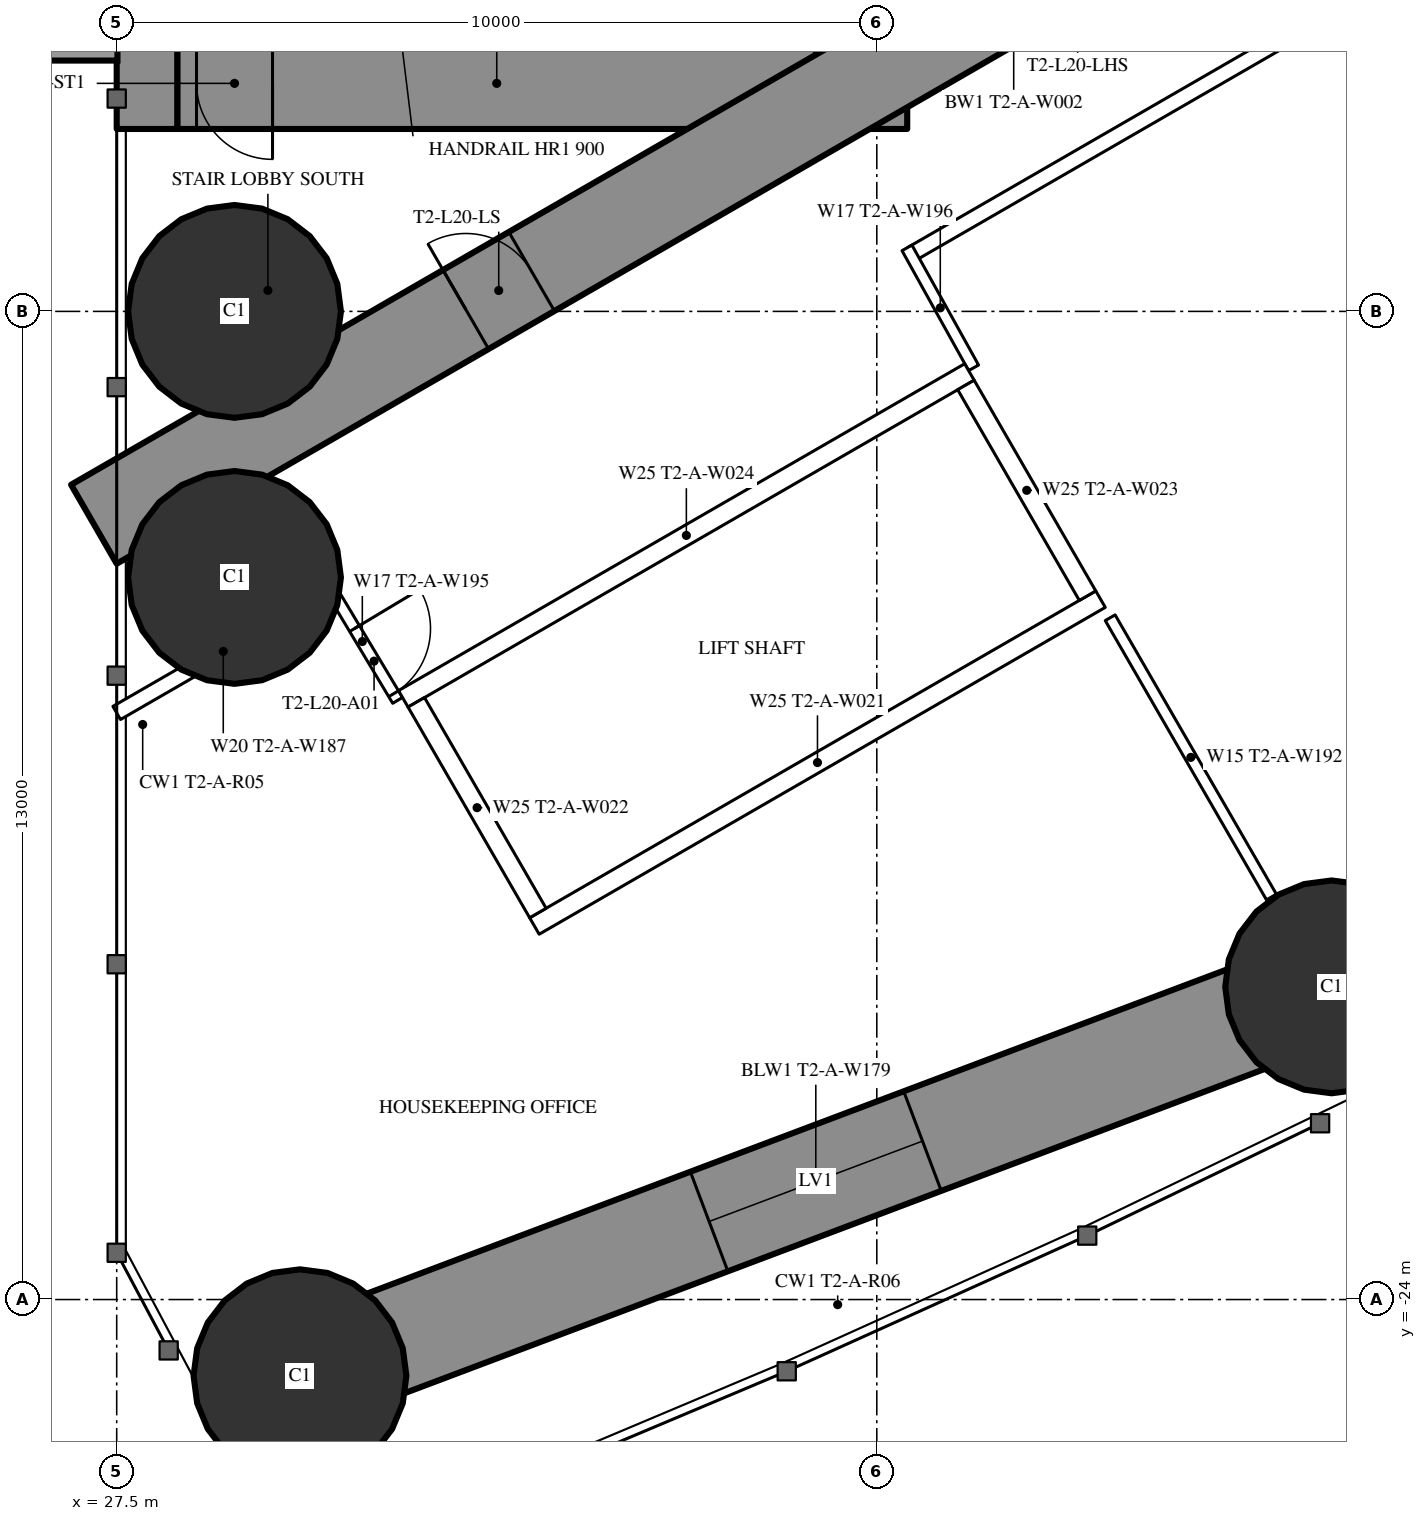
"""IFC4 building model, lengths in metres.
Left out: names, types, materials, properties, quantities, classifications, styles, units other than length and angle.
Written with IfcOpenShell. Run it as: python <this file> out.ifc"""

import sys

from ifc_helpers import new_model, si_unit, direction, frame, frame_2d, origin, origin_2d, place, context, subcontext, project, spatial, rectangle, hollow_circle, extrude, element, fill, save


model = new_model("IFC4")
c1 = context("Model", 3, precision=1e-05, world=origin(), true_north=direction((0.0, 1.0)))
c2 = subcontext(c1, "Body", "Model", "MODEL_VIEW")
j1 = project(units=[si_unit("LENGTHUNIT", "METRE"), si_unit("PLANEANGLEUNIT", "RADIAN")], contexts=[c1])
p1 = place(None, origin())
s1 = spatial("IfcSite", under=j1, at=p1, CompositionType="ELEMENT")
p2 = place(p1, origin())
s2 = spatial("IfcBuilding", under=s1, at=p2, CompositionType="ELEMENT")
p3 = place(p2, frame((0.0, 0.0, 77.5)))
s3 = spatial("IfcBuildingStorey", under=s2, at=p3, CompositionType="ELEMENT", Elevation=77.5)
for number, where, z_axis, x_axis in (
    (1, (29.911, -25.002, 0.0), (0.0, 0.0, 1.0), (1.0, 0.0, 0.0)),
    (2, (29.05, -11.0, 0.0), (0.0, 0.0, 1.0), (1.0, 0.0, 0.0)),
    (3, (29.05, -14.5, 0.0), (0.0, 0.0, 1.0), (1.0, 0.0, 0.0)),
    (4, (43.484, -19.886, 0.0), (0.0, 0.0, 1.0), (1.0, 0.0, 0.0)),
):
    element("IfcColumn", number, at=place(p3, frame(where, z_axis=z_axis, x_axis=x_axis)), inside=s3, PredefinedType="COLUMN", context=c2, shape_type="SweptSolid", body=[
        extrude(hollow_circle(Radius=1.4, WallThickness=0.12, at=origin_2d()), origin(), (0.0, 0.0, 1.0), 3.5),
    ])
p4 = place(p3, frame((27.9, -8.6, 0.0), z_axis=(0.0, 0.0, 1.0), x_axis=(0.0, 1.0, 0.0)))
e5 = element("IfcWall", 5, at=p4, inside=s3, PredefinedType="SHEAR", context=c2, shape_type="SweptSolid", body=[
    extrude(rectangle(XDim=17.2, YDim=0.8, at=frame_2d((8.6, 0.0))), origin(), (0.0, 0.0, 1.0), 3.5),
])
p5 = place(p4, frame((2.45, 0.0, 0.6)))
e6 = element("IfcOpeningElement", 6, at=p5, cuts=e5, PredefinedType="OPENING", context=c2, shape_type="SweptSolid", body=[
    extrude(rectangle(XDim=0.6, YDim=2.1, at=frame_2d((0.3, 1.05))), frame((0.0, 0.41, 0.0), z_axis=(0.0, -1.0, 0.0), x_axis=(1.0, 0.0, 0.0)), (0.0, 0.0, 1.0), 0.82),
])
p6 = place(p4, frame((14.15, 0.0, 0.6)))
e7 = element("IfcOpeningElement", 7, at=p6, cuts=e5, PredefinedType="OPENING", context=c2, shape_type="SweptSolid", body=[
    extrude(rectangle(XDim=0.6, YDim=2.1, at=frame_2d((0.3, 1.05))), frame((0.0, 0.41, 0.0), z_axis=(0.0, -1.0, 0.0), x_axis=(1.0, 0.0, 0.0)), (0.0, 0.0, 1.0), 0.82),
])
p7 = place(p3, frame((37.3, -8.6, 0.0), z_axis=(0.0, 0.0, 1.0), x_axis=(0.0, 1.0, 0.0)))
e8 = element("IfcWall", 8, at=p7, inside=s3, PredefinedType="SHEAR", context=c2, shape_type="SweptSolid", body=[
    extrude(rectangle(XDim=17.2, YDim=1.2, at=frame_2d((8.6, 0.0))), origin(), (0.0, 0.0, 1.0), 3.5),
])
p8 = place(p7, frame((7.7, 0.0, 0.0)))
e9 = element("IfcOpeningElement", 9, at=p8, cuts=e8, PredefinedType="OPENING", context=c2, shape_type="SweptSolid", body=[
    extrude(rectangle(XDim=1.8, YDim=2.2, at=frame_2d((0.9, 1.1))), frame((0.0, 0.61, 0.0), z_axis=(0.0, -1.0, 0.0), x_axis=(1.0, 0.0, 0.0)), (0.0, 0.0, 1.0), 1.22),
])
p9 = place(p3, frame((28.3, -8.0, 0.0), z_axis=(0.0, 0.0, 1.0), x_axis=(1.0, 0.0, 0.0)))
e10 = element("IfcWall", 10, at=p9, inside=s3, PredefinedType="SHEAR", context=c2, shape_type="SweptSolid", body=[
    extrude(rectangle(XDim=8.4, YDim=1.2, at=frame_2d((4.2, 0.0))), origin(), (0.0, 0.0, 1.0), 3.5),
])
p10 = place(p9, frame((0.25, 0.0, 0.0)))
e11 = element("IfcOpeningElement", 11, at=p10, cuts=e10, PredefinedType="OPENING", context=c2, shape_type="SweptSolid", body=[
    extrude(rectangle(XDim=1.0, YDim=2.2, at=frame_2d((0.5, 1.1))), frame((0.0, 0.61, 0.0), z_axis=(0.0, -1.0, 0.0), x_axis=(1.0, 0.0, 0.0)), (0.0, 0.0, 1.0), 1.22),
])
p11 = place(p3, frame((27.2, -13.8, 0.0), z_axis=(0.0, 0.0, 1.0), x_axis=(0.866027159892, 0.499996958321, 0.0)))
e12 = element("IfcWall", 12, at=p11, inside=s3, PredefinedType="SHEAR", context=c2, shape_type="SweptSolid", body=[
    extrude(rectangle(XDim=27.947, YDim=1.2, at=frame_2d((13.973, 0.0))), origin(), (0.0, 0.0, 1.0), 3.5),
])
p12 = place(p11, frame((5.65, 0.0, 0.0)))
e13 = element("IfcOpeningElement", 13, at=p12, cuts=e12, PredefinedType="OPENING", context=c2, shape_type="SweptSolid", body=[
    extrude(rectangle(XDim=1.0, YDim=2.2, at=frame_2d((0.5, 1.1))), frame((0.0, 0.61, 0.0), z_axis=(0.0, -1.0, 0.0), x_axis=(1.0, 0.0, 0.0)), (0.0, 0.0, 1.0), 1.22),
])
p13 = place(p11, frame((14.045, 0.0, 0.0)))
e14 = element("IfcOpeningElement", 14, at=p13, cuts=e12, PredefinedType="OPENING", context=c2, shape_type="SweptSolid", body=[
    extrude(rectangle(XDim=1.8, YDim=2.2, at=frame_2d((0.9, 1.1))), frame((0.0, 0.61, 0.0), z_axis=(0.0, -1.0, 0.0), x_axis=(1.0, 0.0, 0.0)), (0.0, 0.0, 1.0), 1.22),
])
p14 = place(p3, frame((29.911, -25.002, 0.0), z_axis=(0.0, 0.0, 1.0), x_axis=(0.935736448066, 0.352700013836, 0.0)))
e15 = element("IfcWall", 15, at=p14, inside=s3, PredefinedType="SHEAR", context=c2, shape_type="SweptSolid", body=[
    extrude(rectangle(XDim=14.505, YDim=1.4, at=frame_2d((7.252, 0.0))), origin(), (0.0, 0.0, 1.0), 3.5),
])
p15 = place(p14, frame((5.752, 0.0, 0.6)))
e16 = element("IfcOpeningElement", 16, at=p15, cuts=e15, PredefinedType="OPENING", context=c2, shape_type="SweptSolid", body=[
    extrude(rectangle(XDim=3.0, YDim=1.2, at=frame_2d((1.5, 0.6))), frame((0.0, 0.71, 0.0), z_axis=(0.0, -1.0, 0.0), x_axis=(1.0, 0.0, 0.0)), (0.0, 0.0, 1.0), 1.42),
])
p16 = place(p3, frame((43.484, -19.886, 0.0), z_axis=(0.0, 0.0, 1.0), x_axis=(0.87736889738, 0.479816441893, 0.0)))
e17 = element("IfcWall", 17, at=p16, inside=s3, PredefinedType="SHEAR", context=c2, shape_type="SweptSolid", body=[
    extrude(rectangle(XDim=12.892, YDim=1.4, at=frame_2d((6.446, 0.0))), origin(), (0.0, 0.0, 1.0), 3.5),
])
p17 = place(p16, frame((4.946, 0.0, 0.6)))
e18 = element("IfcOpeningElement", 18, at=p17, cuts=e17, PredefinedType="OPENING", context=c2, shape_type="SweptSolid", body=[
    extrude(rectangle(XDim=3.0, YDim=1.2, at=frame_2d((1.5, 0.6))), frame((0.0, 0.71, 0.0), z_axis=(0.0, -1.0, 0.0), x_axis=(1.0, 0.0, 0.0)), (0.0, 0.0, 1.0), 1.42),
])
p18 = place(p3, frame((40.57, -15.03, 0.0), z_axis=(0.0, 0.0, 1.0), x_axis=(0.500012993597, -0.866017901798, 0.0)))
e19 = element("IfcWall", 19, at=p18, inside=s3, PredefinedType="PARTITIONING", context=c2, shape_type="SweptSolid", body=[
    extrude(rectangle(XDim=4.243, YDim=0.15, at=frame_2d((2.122, 0.0))), origin(), (0.0, 0.0, 1.0), 3.25),
])
p19 = place(p3, frame((27.5, -16.282, 0.0), z_axis=(0.0, 0.0, 1.0), x_axis=(0.866039938485, 0.499974824316, 0.0)))
e20 = element("IfcWall", 20, at=p19, inside=s3, PredefinedType="PARTITIONING", context=c2, shape_type="SweptSolid", body=[
    extrude(rectangle(XDim=3.238, YDim=0.2, at=frame_2d((1.619, 0.0))), origin(), (0.0, 0.0, 1.0), 3.25),
])
p20 = place(p3, frame((37.96, -10.243, 0.0), z_axis=(0.0, 0.0, 1.0), x_axis=(0.866026429433, 0.499998223521, 0.0)))
e21 = element("IfcWall", 21, at=p20, inside=s3, PredefinedType="PARTITIONING", context=c2, shape_type="SweptSolid", body=[
    extrude(rectangle(XDim=20.487, YDim=0.2, at=frame_2d((10.243, 0.0))), origin(), (0.0, 0.0, 1.0), 3.25),
])
p21 = place(p20, frame((14.142, 0.0, 0.0)))
e22 = element("IfcOpeningElement", 22, at=p21, cuts=e21, PredefinedType="OPENING", context=c2, shape_type="SweptSolid", body=[
    extrude(rectangle(XDim=1.8, YDim=2.2, at=frame_2d((0.9, 1.1))), frame((0.0, 0.11, 0.0), z_axis=(0.0, -1.0, 0.0), x_axis=(1.0, 0.0, 0.0)), (0.0, 0.0, 1.0), 0.22),
])
p22 = place(p20, frame((17.836, 0.0, 0.0)))
e23 = element("IfcOpeningElement", 23, at=p22, cuts=e21, PredefinedType="OPENING", context=c2, shape_type="SweptSolid", body=[
    extrude(rectangle(XDim=1.8, YDim=2.04, at=frame_2d((0.9, 1.02))), frame((0.0, 0.11, 0.0), z_axis=(0.0, -1.0, 0.0), x_axis=(1.0, 0.0, 0.0)), (0.0, 0.0, 1.0), 0.22),
])
p23 = place(p20, frame((5.55, 0.0, 0.0)))
e24 = element("IfcOpeningElement", 24, at=p23, cuts=e21, PredefinedType="OPENING", context=c2, shape_type="SweptSolid", body=[
    extrude(rectangle(XDim=2.0, YDim=2.4, at=frame_2d((1.0, 1.2))), frame((0.0, 0.11, 0.0), z_axis=(0.0, -1.0, 0.0), x_axis=(1.0, 0.0, 0.0)), (0.0, 0.0, 1.0), 0.22),
])
p24 = place(p3, frame((30.267, -14.569, 0.0), z_axis=(0.0, 0.0, 1.0), x_axis=(0.514336634837, -0.857588377991, 0.0)))
e25 = element("IfcWall", 25, at=p24, inside=s3, PredefinedType="PARTITIONING", context=c2, shape_type="SweptSolid", body=[
    extrude(rectangle(XDim=1.805, YDim=0.15, at=frame_2d((0.903, 0.0))), origin(), (0.0, 0.0, 1.0), 3.25),
])
p25 = place(p24, frame((0.703, 0.0, 0.0)))
e26 = element("IfcOpeningElement", 26, at=p25, cuts=e25, PredefinedType="OPENING", context=c2, shape_type="SweptSolid", body=[
    extrude(rectangle(XDim=1.0, YDim=2.04, at=frame_2d((0.5, 1.02))), frame((0.0, 0.085, 0.0), z_axis=(0.0, -1.0, 0.0), x_axis=(1.0, 0.0, 0.0)), (0.0, 0.0, 1.0), 0.17),
])
p26 = place(p3, frame((38.773, -11.742, 0.0), z_axis=(0.0, 0.0, 1.0), x_axis=(-0.485528096672, 0.8742210632, 0.0)))
e27 = element("IfcWall", 27, at=p26, inside=s3, PredefinedType="PARTITIONING", context=c2, shape_type="SweptSolid", body=[
    extrude(rectangle(XDim=1.805, YDim=0.15, at=frame_2d((0.903, 0.0))), origin(), (0.0, 0.0, 1.0), 3.25),
])
for number, where, z_axis, x_axis in (
    (28, (31.271, -16.097, 0.0), (0.0, 0.0, 1.0), (0.866, 0.5, 0.0)),
    (29, (32.996, -19.086, 0.0), (0.0, 0.0, 1.0), (0.866, 0.5, 0.0)),
):
    element("IfcWall", number, at=place(p3, frame(where, z_axis=z_axis, x_axis=x_axis)), inside=s3, PredefinedType="PARTITIONING", context=c2, shape_type="SweptSolid", body=[
        extrude(rectangle(XDim=8.6, YDim=0.25, at=frame_2d((4.3, 0.0))), origin(), (0.0, 0.0, 1.0), 3.25),
    ])
for number, where, z_axis, x_axis in (
    (30, (31.441, -16.143, 0.0), (0.0, 0.0, 1.0), (0.5, -0.866, 0.0)),
    (31, (38.673, -11.968, 0.0), (0.0, 0.0, 1.0), (0.5, -0.866, 0.0)),
):
    element("IfcWall", number, at=place(p3, frame(where, z_axis=z_axis, x_axis=x_axis)), inside=s3, PredefinedType="PARTITIONING", context=c2, shape_type="SweptSolid", body=[
        extrude(rectangle(XDim=3.201, YDim=0.25, at=frame_2d((1.6, 0.0))), origin(), (0.0, 0.0, 1.0), 3.25),
    ])
p27 = place(p15, origin())
e32 = element("IfcWindow", 32, at=p27, inside=s3, PartitioningType="SINGLE_PANEL", PredefinedType="WINDOW", context=c2, shape_type="SweptSolid", body=[
    extrude(rectangle(XDim=3.0, YDim=1.2, at=frame_2d((1.5, 0.6))), frame((0.0, 0.03, 0.0), z_axis=(0.0, -1.0, 0.0), x_axis=(1.0, 0.0, 0.0)), (0.0, 0.0, 1.0), 0.06),
])
fill(e16, e32)
p28 = place(p25, origin())
e33 = element("IfcDoor", 33, at=p28, inside=s3, OperationType="SINGLE_SWING_LEFT", PredefinedType="DOOR", context=c2, shape_type="SweptSolid", body=[
    extrude(rectangle(XDim=1.0, YDim=2.04, at=frame_2d((0.5, 1.02))), frame((0.0, 0.025, 0.0), z_axis=(0.0, -1.0, 0.0), x_axis=(1.0, 0.0, 0.0)), (0.0, 0.0, 1.0), 0.05),
])
fill(e26, e33)
p29 = place(p12, origin())
e34 = element("IfcDoor", 34, at=p29, inside=s3, OperationType="SINGLE_SWING_LEFT", PredefinedType="DOOR", context=c2, shape_type="SweptSolid", body=[
    extrude(rectangle(XDim=1.0, YDim=2.2, at=frame_2d((0.5, 1.1))), frame((0.0, 0.025, 0.0), z_axis=(0.0, -1.0, 0.0), x_axis=(1.0, 0.0, 0.0)), (0.0, 0.0, 1.0), 0.05),
])
fill(e13, e34)
p30 = place(p10, origin())
e35 = element("IfcDoor", 35, at=p30, inside=s3, OperationType="SINGLE_SWING_RIGHT", PredefinedType="DOOR", context=c2, shape_type="SweptSolid", body=[
    extrude(rectangle(XDim=1.0, YDim=2.2, at=frame_2d((0.5, 1.1))), frame((0.0, 0.025, 0.0), z_axis=(0.0, -1.0, 0.0), x_axis=(1.0, 0.0, 0.0)), (0.0, 0.0, 1.0), 0.05),
])
fill(e11, e35)
save(model, sys.argv[1])
